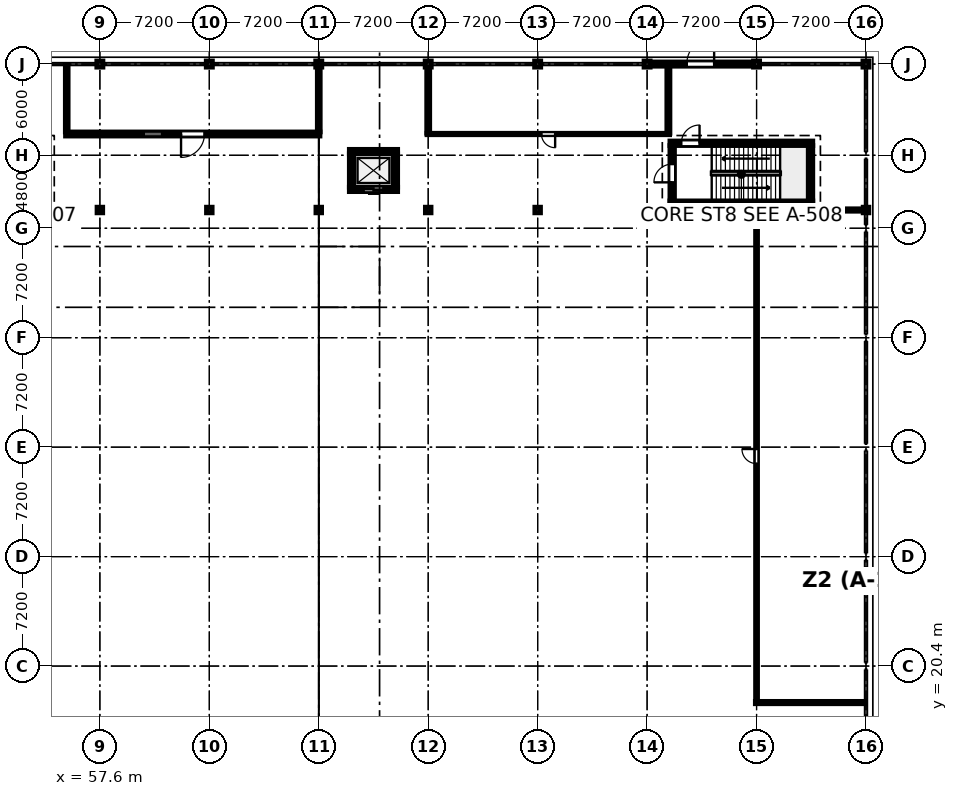
"""IFC4 building model, lengths in metres.
Left out: names, types, materials, properties, quantities, classifications, styles, units other than length and angle.
Written with IfcOpenShell. Run it as: python <this file> out.ifc"""

import sys

from ifc_helpers import new_model, si_unit, direction, frame, frame_2d, origin, origin_2d, place, context, subcontext, project, spatial, rectangle, i_section, extrude, element, fill, save


model = new_model("IFC4")
c1 = context("Model", 3, precision=1e-05, world=origin(), true_north=direction((0.0, 1.0)))
c2 = subcontext(c1, "Body", "Model", "MODEL_VIEW")
j1 = project(units=[si_unit("LENGTHUNIT", "METRE"), si_unit("PLANEANGLEUNIT", "RADIAN")], contexts=[c1])
p1 = place(None, origin())
s1 = spatial("IfcSite", under=j1, at=p1, CompositionType="ELEMENT")
p2 = place(p1, origin())
s2 = spatial("IfcBuilding", under=s1, at=p2, CompositionType="ELEMENT")
p3 = place(p2, origin())
s3 = spatial("IfcBuildingStorey", under=s2, at=p3, CompositionType="ELEMENT", Elevation=0.0)
p4 = place(p3, frame((57.6, 50.4, 0.0), z_axis=(0.0, 0.0, 1.0), x_axis=(1.0, 0.0, 0.0)))
e1 = element("IfcColumn", 1, at=p4, inside=s3, PredefinedType="COLUMN", context=c2, shape_type="SweptSolid", body=[
    extrude(i_section(OverallWidth=0.373, OverallDepth=0.373, WebThickness=0.016, FlangeThickness=0.026, FilletRadius=0.015, at=origin_2d()), origin(), (0.0, 0.0, 1.0), 5.4),
])
p5 = place(p3, frame((57.6, 60.0, 0.0), z_axis=(0.0, 0.0, 1.0), x_axis=(1.0, 0.0, 0.0)))
e2 = element("IfcColumn", 2, at=p5, inside=s3, PredefinedType="COLUMN", context=c2, shape_type="SweptSolid", body=[
    extrude(i_section(OverallWidth=0.404, OverallDepth=0.406, WebThickness=0.027, FlangeThickness=0.044, FilletRadius=0.015, at=origin_2d()), origin(), (0.0, 0.0, 1.0), 6.0),
])
p6 = place(p3, frame((64.8, 50.4, 0.0), z_axis=(0.0, 0.0, 1.0), x_axis=(1.0, 0.0, 0.0)))
e3 = element("IfcColumn", 3, at=p6, inside=s3, PredefinedType="COLUMN", context=c2, shape_type="SweptSolid", body=[
    extrude(i_section(OverallWidth=0.373, OverallDepth=0.373, WebThickness=0.016, FlangeThickness=0.026, FilletRadius=0.015, at=origin_2d()), origin(), (0.0, 0.0, 1.0), 5.4),
])
p7 = place(p3, frame((64.8, 60.0, 0.0), z_axis=(0.0, 0.0, 1.0), x_axis=(1.0, 0.0, 0.0)))
e4 = element("IfcColumn", 4, at=p7, inside=s3, PredefinedType="COLUMN", context=c2, shape_type="SweptSolid", body=[
    extrude(i_section(OverallWidth=0.404, OverallDepth=0.406, WebThickness=0.027, FlangeThickness=0.044, FilletRadius=0.015, at=origin_2d()), origin(), (0.0, 0.0, 1.0), 6.0),
])
p8 = place(p3, frame((72.0, 50.4, 0.0), z_axis=(0.0, 0.0, 1.0), x_axis=(1.0, 0.0, 0.0)))
e5 = element("IfcColumn", 5, at=p8, inside=s3, PredefinedType="COLUMN", context=c2, shape_type="SweptSolid", body=[
    extrude(i_section(OverallWidth=0.373, OverallDepth=0.373, WebThickness=0.016, FlangeThickness=0.026, FilletRadius=0.015, at=origin_2d()), origin(), (0.0, 0.0, 1.0), 5.4),
])
p9 = place(p3, frame((72.0, 60.0, 0.0), z_axis=(0.0, 0.0, 1.0), x_axis=(1.0, 0.0, 0.0)))
e6 = element("IfcColumn", 6, at=p9, inside=s3, PredefinedType="COLUMN", context=c2, shape_type="SweptSolid", body=[
    extrude(i_section(OverallWidth=0.404, OverallDepth=0.406, WebThickness=0.027, FlangeThickness=0.044, FilletRadius=0.015, at=origin_2d()), origin(), (0.0, 0.0, 1.0), 6.0),
])
p10 = place(p3, frame((79.2, 50.4, 0.0), z_axis=(0.0, 0.0, 1.0), x_axis=(1.0, 0.0, 0.0)))
e7 = element("IfcColumn", 7, at=p10, inside=s3, PredefinedType="COLUMN", context=c2, shape_type="SweptSolid", body=[
    extrude(i_section(OverallWidth=0.373, OverallDepth=0.373, WebThickness=0.016, FlangeThickness=0.026, FilletRadius=0.015, at=origin_2d()), origin(), (0.0, 0.0, 1.0), 5.4),
])
p11 = place(p3, frame((79.2, 60.0, 0.0), z_axis=(0.0, 0.0, 1.0), x_axis=(1.0, 0.0, 0.0)))
e8 = element("IfcColumn", 8, at=p11, inside=s3, PredefinedType="COLUMN", context=c2, shape_type="SweptSolid", body=[
    extrude(i_section(OverallWidth=0.404, OverallDepth=0.406, WebThickness=0.027, FlangeThickness=0.044, FilletRadius=0.015, at=origin_2d()), origin(), (0.0, 0.0, 1.0), 6.0),
])
p12 = place(p3, frame((86.4, 50.4, 0.0), z_axis=(0.0, 0.0, 1.0), x_axis=(1.0, 0.0, 0.0)))
e9 = element("IfcColumn", 9, at=p12, inside=s3, PredefinedType="COLUMN", context=c2, shape_type="SweptSolid", body=[
    extrude(i_section(OverallWidth=0.373, OverallDepth=0.373, WebThickness=0.016, FlangeThickness=0.026, FilletRadius=0.015, at=origin_2d()), origin(), (0.0, 0.0, 1.0), 5.4),
])
p13 = place(p3, frame((86.4, 60.0, 0.0), z_axis=(0.0, 0.0, 1.0), x_axis=(1.0, 0.0, 0.0)))
e10 = element("IfcColumn", 10, at=p13, inside=s3, PredefinedType="COLUMN", context=c2, shape_type="SweptSolid", body=[
    extrude(i_section(OverallWidth=0.404, OverallDepth=0.406, WebThickness=0.027, FlangeThickness=0.044, FilletRadius=0.015, at=origin_2d()), origin(), (0.0, 0.0, 1.0), 6.0),
])
p14 = place(p3, frame((93.6, 50.4, 0.0), z_axis=(0.0, 0.0, 1.0), x_axis=(1.0, 0.0, 0.0)))
e11 = element("IfcColumn", 11, at=p14, inside=s3, PredefinedType="COLUMN", context=c2, shape_type="SweptSolid", body=[
    extrude(i_section(OverallWidth=0.373, OverallDepth=0.373, WebThickness=0.016, FlangeThickness=0.026, FilletRadius=0.015, at=origin_2d()), origin(), (0.0, 0.0, 1.0), 5.4),
])
p15 = place(p3, frame((93.6, 60.0, 0.0), z_axis=(0.0, 0.0, 1.0), x_axis=(1.0, 0.0, 0.0)))
e12 = element("IfcColumn", 12, at=p15, inside=s3, PredefinedType="COLUMN", context=c2, shape_type="SweptSolid", body=[
    extrude(i_section(OverallWidth=0.404, OverallDepth=0.406, WebThickness=0.027, FlangeThickness=0.044, FilletRadius=0.015, at=origin_2d()), origin(), (0.0, 0.0, 1.0), 6.0),
])
p16 = place(p3, frame((100.8, 50.4, 0.0), z_axis=(0.0, 0.0, 1.0), x_axis=(1.0, 0.0, 0.0)))
e13 = element("IfcColumn", 13, at=p16, inside=s3, PredefinedType="COLUMN", context=c2, shape_type="SweptSolid", body=[
    extrude(i_section(OverallWidth=0.373, OverallDepth=0.373, WebThickness=0.016, FlangeThickness=0.026, FilletRadius=0.015, at=origin_2d()), origin(), (0.0, 0.0, 1.0), 5.4),
])
p17 = place(p3, frame((100.8, 60.0, 0.0), z_axis=(0.0, 0.0, 1.0), x_axis=(1.0, 0.0, 0.0)))
e14 = element("IfcColumn", 14, at=p17, inside=s3, PredefinedType="COLUMN", context=c2, shape_type="SweptSolid", body=[
    extrude(i_section(OverallWidth=0.404, OverallDepth=0.406, WebThickness=0.027, FlangeThickness=0.044, FilletRadius=0.015, at=origin_2d()), origin(), (0.0, 0.0, 1.0), 6.0),
])
p18 = place(p3, frame((108.0, 50.4, 0.0), z_axis=(0.0, 0.0, 1.0), x_axis=(1.0, 0.0, 0.0)))
e15 = element("IfcColumn", 15, at=p18, inside=s3, PredefinedType="COLUMN", context=c2, shape_type="SweptSolid", body=[
    extrude(i_section(OverallWidth=0.373, OverallDepth=0.373, WebThickness=0.016, FlangeThickness=0.026, FilletRadius=0.015, at=origin_2d()), origin(), (0.0, 0.0, 1.0), 5.4),
])
p19 = place(p3, frame((108.0, 60.0, 0.0), z_axis=(0.0, 0.0, 1.0), x_axis=(1.0, 0.0, 0.0)))
e16 = element("IfcColumn", 16, at=p19, inside=s3, PredefinedType="COLUMN", context=c2, shape_type="SweptSolid", body=[
    extrude(i_section(OverallWidth=0.404, OverallDepth=0.406, WebThickness=0.027, FlangeThickness=0.044, FilletRadius=0.015, at=origin_2d()), origin(), (0.0, 0.0, 1.0), 6.0),
])
p20 = place(p3, frame((93.809, 60.0, 0.0), z_axis=(0.0, 0.0, 1.0), x_axis=(1.0, 0.0, 0.0)))
e17 = element("IfcWall", 17, at=p20, inside=s3, PredefinedType="STANDARD", context=c2, shape_type="SweptSolid", body=[
    extrude(rectangle(XDim=6.782, YDim=0.28, at=frame_2d((3.391, 0.0))), origin(), (0.0, 0.0, 1.0), 4.482),
])
p21 = place(p20, frame((2.401, 0.0, 0.0)))
e18 = element("IfcOpeningElement", 18, at=p21, cuts=e17, PredefinedType="OPENING", context=c2, shape_type="SweptSolid", body=[
    extrude(rectangle(XDim=1.8, YDim=2.2, at=frame_2d((0.9, 1.1))), frame((0.0, 0.15, 0.0), z_axis=(0.0, -1.0, 0.0), x_axis=(1.0, 0.0, 0.0)), (0.0, 0.0, 1.0), 0.3),
])
p22 = place(p3, frame((104.5, 50.85, 0.0), z_axis=(0.0, 0.0, 1.0), x_axis=(-1.0, 0.0, 0.0)))
e19 = element("IfcWall", 19, at=p22, inside=s3, PredefinedType="SOLIDWALL", context=c2, shape_type="SweptSolid", body=[
    extrude(rectangle(XDim=9.4, YDim=0.3, at=frame_2d((4.7, 0.0))), origin(), (0.0, 0.0, 1.0), 5.18),
])
p23 = place(p3, frame((95.1, 54.79, 0.0), z_axis=(0.0, 0.0, 1.0), x_axis=(1.0, 0.0, 0.0)))
e20 = element("IfcWall", 20, at=p23, inside=s3, PredefinedType="SOLIDWALL", context=c2, shape_type="SweptSolid", body=[
    extrude(rectangle(XDim=9.4, YDim=0.3, at=frame_2d((4.7, 0.0))), origin(), (0.0, 0.0, 1.0), 5.18),
])
p24 = place(p23, frame((0.75, 0.0, 0.0)))
e21 = element("IfcOpeningElement", 21, at=p24, cuts=e20, PredefinedType="OPENING", context=c2, shape_type="SweptSolid", body=[
    extrude(rectangle(XDim=1.2, YDim=2.2, at=frame_2d((0.6, 1.1))), frame((0.0, 0.16, 0.0), z_axis=(0.0, -1.0, 0.0), x_axis=(1.0, 0.0, 0.0)), (0.0, 0.0, 1.0), 0.32),
])
p25 = place(p3, frame((95.25, 51.0, 0.0), z_axis=(0.0, 0.0, 1.0), x_axis=(0.0, 1.0, 0.0)))
e22 = element("IfcWall", 22, at=p25, inside=s3, PredefinedType="SOLIDWALL", context=c2, shape_type="SweptSolid", body=[
    extrude(rectangle(XDim=3.64, YDim=0.3, at=frame_2d((1.82, 0.0))), origin(), (0.0, 0.0, 1.0), 5.18),
])
p26 = place(p25, frame((1.22, 0.0, 0.0)))
e23 = element("IfcOpeningElement", 23, at=p26, cuts=e22, PredefinedType="OPENING", context=c2, shape_type="SweptSolid", body=[
    extrude(rectangle(XDim=1.2, YDim=2.2, at=frame_2d((0.6, 1.1))), frame((0.0, 0.16, 0.0), z_axis=(0.0, -1.0, 0.0), x_axis=(1.0, 0.0, 0.0)), (0.0, 0.0, 1.0), 0.32),
])
p27 = place(p3, frame((104.35, 54.64, 0.0), z_axis=(0.0, 0.0, 1.0), x_axis=(0.0, -1.0, 0.0)))
e24 = element("IfcWall", 24, at=p27, inside=s3, PredefinedType="SOLIDWALL", context=c2, shape_type="SweptSolid", body=[
    extrude(rectangle(XDim=3.64, YDim=0.3, at=frame_2d((1.82, 0.0))), origin(), (0.0, 0.0, 1.0), 5.18),
])
p28 = place(p3, frame((77.19, 51.755, 0.0), z_axis=(0.0, 0.0, 1.0), x_axis=(-1.0, 0.0, 0.0)))
e25 = element("IfcWall", 25, at=p28, inside=s3, PredefinedType="SHEAR", context=c2, shape_type="SweptSolid", body=[
    extrude(rectangle(XDim=3.18, YDim=0.29, at=frame_2d((1.59, 0.0))), origin(), (0.0, 0.0, 1.0), 5.18),
])
p29 = place(p28, frame((0.94, 0.0, 0.0)))
e26 = element("IfcOpeningElement", 26, at=p29, cuts=e25, PredefinedType="OPENING", context=c2, shape_type="SweptSolid", body=[
    extrude(rectangle(XDim=1.3, YDim=2.2, at=frame_2d((0.65, 1.1))), frame((0.0, 0.155, 0.0), z_axis=(0.0, -1.0, 0.0), x_axis=(1.0, 0.0, 0.0)), (0.0, 0.0, 1.0), 0.31),
])
p30 = place(p3, frame((74.01, 54.245, 0.0), z_axis=(0.0, 0.0, 1.0), x_axis=(1.0, 0.0, 0.0)))
e27 = element("IfcWall", 27, at=p30, inside=s3, PredefinedType="SHEAR", context=c2, shape_type="SweptSolid", body=[
    extrude(rectangle(XDim=3.18, YDim=0.29, at=frame_2d((1.59, 0.0))), origin(), (0.0, 0.0, 1.0), 5.18),
])
for number, where, z_axis, x_axis in (
    (28, (74.155, 51.9, 0.0), (0.0, 0.0, 1.0), (0.0, 1.0, 0.0)),
    (29, (77.045, 54.1, 0.0), (0.0, 0.0, 1.0), (0.0, -1.0, 0.0)),
):
    element("IfcWall", number, at=place(p3, frame(where, z_axis=z_axis, x_axis=x_axis)), inside=s3, PredefinedType="SHEAR", context=c2, shape_type="SweptSolid", body=[
        extrude(rectangle(XDim=2.2, YDim=0.29, at=frame_2d((1.1, 0.0))), origin(), (0.0, 0.0, 1.0), 5.18),
    ])
p31 = place(p3, frame((72.08, 55.4, 0.0), z_axis=(0.0, 0.0, 1.0), x_axis=(-1.0, 0.0, 0.0)))
e30 = element("IfcWall", 30, at=p31, inside=s3, PredefinedType="PARTITIONING", context=c2, shape_type="SweptSolid", body=[
    extrude(rectangle(XDim=16.74, YDim=0.27, at=frame_2d((8.37, 0.0))), origin(), (0.0, 0.0, 1.0), 4.477),
])
p32 = place(p31, frame((7.6, 0.0, 0.0)))
e31 = element("IfcOpeningElement", 31, at=p32, cuts=e30, PredefinedType="OPENING", context=c2, shape_type="SweptSolid", body=[
    extrude(rectangle(XDim=1.54, YDim=2.1, at=frame_2d((0.77, 1.05))), frame((0.0, 0.145, 0.0), z_axis=(0.0, -1.0, 0.0), x_axis=(1.0, 0.0, 0.0)), (0.0, 0.0, 1.0), 0.29),
])
p33 = place(p31, frame((10.39, 0.0, 0.95)))
e32 = element("IfcOpeningElement", 32, at=p33, cuts=e30, PredefinedType="OPENING", context=c2, shape_type="SweptSolid", body=[
    extrude(rectangle(XDim=1.2, YDim=1.0, at=frame_2d((0.6, 0.5))), frame((0.0, 0.145, 0.0), z_axis=(0.0, -1.0, 0.0), x_axis=(1.0, 0.0, 0.0)), (0.0, 0.0, 1.0), 0.29),
])
p34 = place(p3, frame((95.08, 55.4, 0.0), z_axis=(0.0, 0.0, 1.0), x_axis=(-1.0, 0.0, 0.0)))
e33 = element("IfcWall", 33, at=p34, inside=s3, PredefinedType="PARTITIONING", context=c2, shape_type="SweptSolid", body=[
    extrude(rectangle(XDim=15.96, YDim=0.095, at=frame_2d((7.98, 0.0))), origin(), (0.0, 0.0, 1.0), 4.477),
])
p35 = place(p34, frame((7.53, 0.0, 0.0)))
e34 = element("IfcOpeningElement", 34, at=p35, cuts=e33, PredefinedType="OPENING", context=c2, shape_type="SweptSolid", body=[
    extrude(rectangle(XDim=0.9, YDim=2.16, at=frame_2d((0.45, 1.08))), frame((0.0, 0.057, 0.0), z_axis=(0.0, -1.0, 0.0), x_axis=(1.0, 0.0, 0.0)), (0.0, 0.0, 1.0), 0.115),
])
p36 = place(p3, frame((107.918, 18.0, 0.0), z_axis=(0.0, 0.0, 1.0), x_axis=(-1.0, 0.0, 0.0)))
e35 = element("IfcWall", 35, at=p36, inside=s3, PredefinedType="PARTITIONING", context=c2, shape_type="SweptSolid", body=[
    extrude(rectangle(XDim=7.198, YDim=0.155, at=frame_2d((3.599, 0.0))), origin(), (0.0, 0.0, 1.0), 4.477),
])
p37 = place(p3, frame((100.72, 50.4, 0.0), z_axis=(0.0, 0.0, 1.0), x_axis=(1.0, 0.0, 0.0)))
e36 = element("IfcWall", 36, at=p37, inside=s3, PredefinedType="PARTITIONING", context=c2, shape_type="SweptSolid", body=[
    extrude(rectangle(XDim=7.198, YDim=0.16, at=frame_2d((3.599, 0.0))), origin(), (0.0, 0.0, 1.0), 4.477),
])
p38 = place(p3, frame((100.8, 18.08, 0.0), z_axis=(0.0, 0.0, 1.0), x_axis=(0.0, 1.0, 0.0)))
e37 = element("IfcWall", 37, at=p38, inside=s3, PredefinedType="PARTITIONING", context=c2, shape_type="SweptSolid", body=[
    extrude(rectangle(XDim=32.238, YDim=0.13, at=frame_2d((16.119, 0.0))), origin(), (0.0, 0.0, 1.0), 4.477),
])
p39 = place(p38, frame((15.639, 0.0, 0.0)))
e38 = element("IfcOpeningElement", 38, at=p39, cuts=e37, PredefinedType="OPENING", context=c2, shape_type="SweptSolid", body=[
    extrude(rectangle(XDim=0.96, YDim=2.16, at=frame_2d((0.48, 1.08))), frame((0.0, 0.075, 0.0), z_axis=(0.0, -1.0, 0.0), x_axis=(1.0, 0.0, 0.0)), (0.0, 0.0, 1.0), 0.15),
])
p40 = place(p38, frame((17.849, 0.0, 0.95)))
e39 = element("IfcOpeningElement", 39, at=p40, cuts=e37, PredefinedType="OPENING", context=c2, shape_type="SweptSolid", body=[
    extrude(rectangle(XDim=1.4, YDim=1.0, at=frame_2d((0.7, 0.5))), frame((0.0, 0.075, 0.0), z_axis=(0.0, -1.0, 0.0), x_axis=(1.0, 0.0, 0.0)), (0.0, 0.0, 1.0), 0.15),
])
p41 = place(p3, frame((55.42, 55.537, 0.0), z_axis=(0.0, 0.0, 1.0), x_axis=(0.0, 1.0, 0.0)))
e40 = element("IfcWall", 40, at=p41, inside=s3, PredefinedType="PARTITIONING", context=c2, shape_type="SweptSolid", body=[
    extrude(rectangle(XDim=4.381, YDim=0.185, at=frame_2d((2.19, 0.0))), origin(), (0.0, 0.0, 1.0), 4.477),
])
p42 = place(p3, frame((72.0, 59.918, 0.0), z_axis=(0.0, 0.0, 1.0), x_axis=(0.0, -1.0, 0.0)))
e41 = element("IfcWall", 41, at=p42, inside=s3, PredefinedType="PARTITIONING", context=c2, shape_type="SweptSolid", body=[
    extrude(rectangle(XDim=4.381, YDim=0.192, at=frame_2d((2.19, 0.0))), origin(), (0.0, 0.0, 1.0), 4.477),
])
p43 = place(p3, frame((79.2, 55.45, 0.0), z_axis=(0.0, 0.0, 1.0), x_axis=(0.0, 1.0, 0.0)))
e42 = element("IfcWall", 42, at=p43, inside=s3, PredefinedType="PARTITIONING", context=c2, shape_type="SweptSolid", body=[
    extrude(rectangle(XDim=4.468, YDim=0.198, at=frame_2d((2.234, 0.0))), origin(), (0.0, 0.0, 1.0), 4.477),
])
p44 = place(p3, frame((95.0, 59.858, 0.0), z_axis=(0.0, 0.0, 1.0), x_axis=(0.0, -1.0, 0.0)))
e43 = element("IfcWall", 43, at=p44, inside=s3, PredefinedType="PARTITIONING", context=c2, shape_type="SweptSolid", body=[
    extrude(rectangle(XDim=4.408, YDim=0.205, at=frame_2d((2.204, 0.0))), origin(), (0.0, 0.0, 1.0), 4.477),
])
p45 = place(p21, origin())
e44 = element("IfcDoor", 44, at=p45, inside=s3, OperationType="SINGLE_SWING_RIGHT", PredefinedType="DOOR", context=c2, shape_type="SweptSolid", body=[
    extrude(rectangle(XDim=1.8, YDim=2.2, at=frame_2d((0.9, 1.1))), frame((0.0, 0.025, 0.0), z_axis=(0.0, -1.0, 0.0), x_axis=(1.0, 0.0, 0.0)), (0.0, 0.0, 1.0), 0.05),
])
fill(e18, e44)
p46 = place(p24, origin())
e45 = element("IfcDoor", 45, at=p46, inside=s3, OperationType="SINGLE_SWING_RIGHT", PredefinedType="DOOR", context=c2, shape_type="SweptSolid", body=[
    extrude(rectangle(XDim=1.2, YDim=2.2, at=frame_2d((0.6, 1.1))), frame((0.0, 0.025, 0.0), z_axis=(0.0, -1.0, 0.0), x_axis=(1.0, 0.0, 0.0)), (0.0, 0.0, 1.0), 0.05),
])
fill(e21, e45)
p47 = place(p26, origin())
e46 = element("IfcDoor", 46, at=p47, inside=s3, OperationType="SINGLE_SWING_LEFT", PredefinedType="DOOR", context=c2, shape_type="SweptSolid", body=[
    extrude(rectangle(XDim=1.2, YDim=2.2, at=frame_2d((0.6, 1.1))), frame((0.0, 0.025, 0.0), z_axis=(0.0, -1.0, 0.0), x_axis=(1.0, 0.0, 0.0)), (0.0, 0.0, 1.0), 0.05),
])
fill(e23, e46)
p48 = place(p29, origin())
e47 = element("IfcDoor", 47, at=p48, inside=s3, OperationType="DOUBLE_DOOR_SLIDING", PredefinedType="DOOR", context=c2, shape_type="SweptSolid", body=[
    extrude(rectangle(XDim=1.3, YDim=2.2, at=frame_2d((0.65, 1.1))), frame((0.0, 0.025, 0.0), z_axis=(0.0, -1.0, 0.0), x_axis=(1.0, 0.0, 0.0)), (0.0, 0.0, 1.0), 0.05),
])
fill(e26, e47)
p49 = place(p32, origin())
e48 = element("IfcDoor", 48, at=p49, inside=s3, OperationType="SINGLE_SWING_RIGHT", PredefinedType="DOOR", context=c2, shape_type="SweptSolid", body=[
    extrude(rectangle(XDim=1.54, YDim=2.1, at=frame_2d((0.77, 1.05))), frame((0.0, 0.025, 0.0), z_axis=(0.0, -1.0, 0.0), x_axis=(1.0, 0.0, 0.0)), (0.0, 0.0, 1.0), 0.05),
])
fill(e31, e48)
p50 = place(p33, origin())
e49 = element("IfcWindow", 49, at=p50, inside=s3, PartitioningType="SINGLE_PANEL", PredefinedType="WINDOW", context=c2, shape_type="SweptSolid", body=[
    extrude(rectangle(XDim=1.2, YDim=1.0, at=frame_2d((0.6, 0.5))), frame((0.0, 0.03, 0.0), z_axis=(0.0, -1.0, 0.0), x_axis=(1.0, 0.0, 0.0)), (0.0, 0.0, 1.0), 0.06),
])
fill(e32, e49)
p51 = place(p35, origin())
e50 = element("IfcDoor", 50, at=p51, inside=s3, OperationType="SINGLE_SWING_LEFT", PredefinedType="DOOR", context=c2, shape_type="SweptSolid", body=[
    extrude(rectangle(XDim=0.9, YDim=2.16, at=frame_2d((0.45, 1.08))), frame((0.0, 0.025, 0.0), z_axis=(0.0, -1.0, 0.0), x_axis=(1.0, 0.0, 0.0)), (0.0, 0.0, 1.0), 0.05),
])
fill(e34, e50)
p52 = place(p39, origin())
e51 = element("IfcDoor", 51, at=p52, inside=s3, OperationType="SINGLE_SWING_RIGHT", PredefinedType="DOOR", context=c2, shape_type="SweptSolid", body=[
    extrude(rectangle(XDim=0.96, YDim=2.16, at=frame_2d((0.48, 1.08))), frame((0.0, 0.025, 0.0), z_axis=(0.0, -1.0, 0.0), x_axis=(1.0, 0.0, 0.0)), (0.0, 0.0, 1.0), 0.05),
])
fill(e38, e51)
p53 = place(p40, origin())
e52 = element("IfcWindow", 52, at=p53, inside=s3, PartitioningType="SINGLE_PANEL", PredefinedType="WINDOW", context=c2, shape_type="SweptSolid", body=[
    extrude(rectangle(XDim=1.4, YDim=1.0, at=frame_2d((0.7, 0.5))), frame((0.0, 0.03, 0.0), z_axis=(0.0, -1.0, 0.0), x_axis=(1.0, 0.0, 0.0)), (0.0, 0.0, 1.0), 0.06),
])
fill(e39, e52)
save(model, sys.argv[1])
